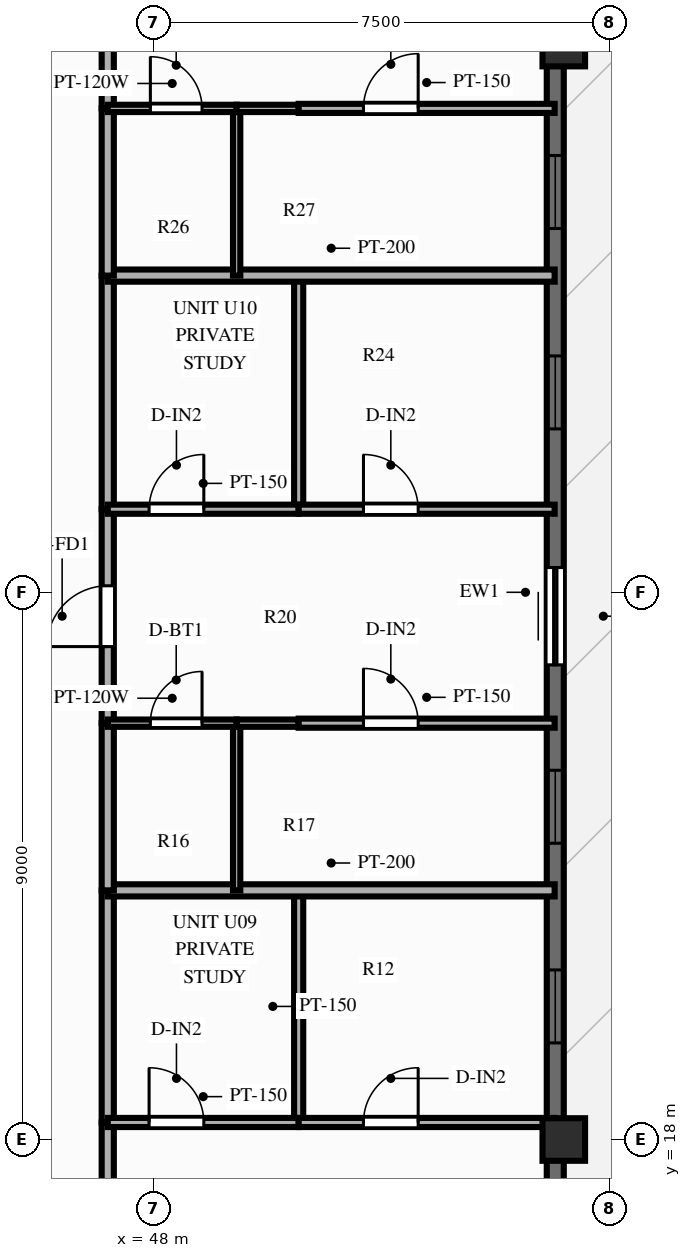
"""IFC4 building model, lengths in metres.
Left out: names, types, materials, properties, quantities, classifications, styles, units other than length and angle.
Written with IfcOpenShell. Run it as: python <this file> out.ifc"""

import sys

from ifc_helpers import new_model, si_unit, direction, frame, frame_2d, origin, origin_2d, place, context, subcontext, project, spatial, rectangle, extrude, source, transform, mapped, element, fill, save


model = new_model("IFC4")
c1 = context("Model", 3, precision=1e-05, world=origin(), true_north=direction((0.0, 1.0)))
c2 = subcontext(c1, "Body", "Model", "MODEL_VIEW")
j1 = project(units=[si_unit("LENGTHUNIT", "METRE"), si_unit("PLANEANGLEUNIT", "RADIAN")], contexts=[c1])
p1 = place(None, origin())
s1 = spatial("IfcSite", under=j1, at=p1, CompositionType="ELEMENT")
p2 = place(p1, origin())
s2 = spatial("IfcBuilding", under=s1, at=p2, CompositionType="ELEMENT")
p3 = place(p2, frame((0.0, 0.0, 236.1)))
s3 = spatial("IfcBuildingStorey", under=s2, at=p3, CompositionType="ELEMENT", Elevation=236.1)
m1 = source(origin(), c2, "Body", "SweptSolid", [
    extrude(rectangle(XDim=0.7, YDim=0.7, at=origin_2d()), origin(), (0.0, 0.0, 1.0), 3.9),
])
for number, where, z_axis, x_axis in (
    (1, (54.75, 18.0, 0.0), (0.0, 0.0, 1.0), (1.0, 0.0, 0.0)),
    (2, (54.75, 36.0, 0.0), (0.0, 0.0, 1.0), (1.0, 0.0, 0.0)),
):
    element("IfcColumn", number, at=place(p3, frame(where, z_axis=z_axis, x_axis=x_axis)), inside=s3, PredefinedType="COLUMN", context=c2, shape_type="MappedRepresentation", body=[
        mapped(m1, transform((0.0, 0.0, 0.0), scale=1.0)),
    ])
p4 = place(p3, frame((54.61, 11.5, 0.0), z_axis=(0.0, 0.0, 1.0), x_axis=(0.0, 1.0, 0.0)))
e3 = element("IfcWall", 3, at=p4, inside=s3, PredefinedType="SOLIDWALL", context=c2, shape_type="SweptSolid", body=[
    extrude(rectangle(XDim=31.0, YDim=0.28, at=frame_2d((15.5, 0.0))), origin(), (0.0, 0.0, 1.0), 2.44),
])
p5 = place(p4, frame((0.96, 0.0, 0.25)))
e4 = element("IfcOpeningElement", 4, at=p5, cuts=e3, PredefinedType="OPENING", context=c2, shape_type="SweptSolid", body=[
    extrude(rectangle(XDim=1.2, YDim=1.5, at=frame_2d((0.6, 0.75))), frame((0.0, 0.152, 0.0), z_axis=(0.0, -1.0, 0.0), x_axis=(1.0, 0.0, 0.0)), (0.0, 0.0, 1.0), 0.304),
])
p6 = place(p4, frame((4.02, 0.0, 0.25)))
e5 = element("IfcOpeningElement", 5, at=p6, cuts=e3, PredefinedType="OPENING", context=c2, shape_type="SweptSolid", body=[
    extrude(rectangle(XDim=1.2, YDim=1.5, at=frame_2d((0.6, 0.75))), frame((0.0, 0.152, 0.0), z_axis=(0.0, -1.0, 0.0), x_axis=(1.0, 0.0, 0.0)), (0.0, 0.0, 1.0), 0.304),
])
p7 = place(p4, frame((8.089, 0.0, 0.25)))
e6 = element("IfcOpeningElement", 6, at=p7, cuts=e3, PredefinedType="OPENING", context=c2, shape_type="SweptSolid", body=[
    extrude(rectangle(XDim=1.2, YDim=1.5, at=frame_2d((0.6, 0.75))), frame((0.0, 0.152, 0.0), z_axis=(0.0, -1.0, 0.0), x_axis=(1.0, 0.0, 0.0)), (0.0, 0.0, 1.0), 0.304),
])
p8 = place(p4, frame((11.373, 0.0, 0.25)))
e7 = element("IfcOpeningElement", 7, at=p8, cuts=e3, PredefinedType="OPENING", context=c2, shape_type="SweptSolid", body=[
    extrude(rectangle(XDim=1.2, YDim=1.5, at=frame_2d((0.6, 0.75))), frame((0.0, 0.152, 0.0), z_axis=(0.0, -1.0, 0.0), x_axis=(1.0, 0.0, 0.0)), (0.0, 0.0, 1.0), 0.304),
])
p9 = place(p4, frame((15.907, 0.0, 0.0), z_axis=(0.0, 0.0, 1.0), x_axis=(-1.0, 0.0, 0.0)))
e8 = element("IfcOpeningElement", 8, at=p9, cuts=e3, PredefinedType="OPENING", context=c2, shape_type="SweptSolid", body=[
    extrude(rectangle(XDim=1.6, YDim=2.15, at=frame_2d((0.8, 1.075))), frame((0.0, 0.152, 0.0), z_axis=(0.0, -1.0, 0.0), x_axis=(1.0, 0.0, 0.0)), (0.0, 0.0, 1.0), 0.304),
])
p10 = place(p4, frame((18.188, 0.0, 0.25)))
e9 = element("IfcOpeningElement", 9, at=p10, cuts=e3, PredefinedType="OPENING", context=c2, shape_type="SweptSolid", body=[
    extrude(rectangle(XDim=1.2, YDim=1.5, at=frame_2d((0.6, 0.75))), frame((0.0, 0.152, 0.0), z_axis=(0.0, -1.0, 0.0), x_axis=(1.0, 0.0, 0.0)), (0.0, 0.0, 1.0), 0.304),
])
p11 = place(p4, frame((21.484, 0.0, 0.25)))
e10 = element("IfcOpeningElement", 10, at=p11, cuts=e3, PredefinedType="OPENING", context=c2, shape_type="SweptSolid", body=[
    extrude(rectangle(XDim=1.2, YDim=1.5, at=frame_2d((0.6, 0.75))), frame((0.0, 0.152, 0.0), z_axis=(0.0, -1.0, 0.0), x_axis=(1.0, 0.0, 0.0)), (0.0, 0.0, 1.0), 0.304),
])
p12 = place(p4, frame((25.234, 0.0, 0.25)))
e11 = element("IfcOpeningElement", 11, at=p12, cuts=e3, PredefinedType="OPENING", context=c2, shape_type="SweptSolid", body=[
    extrude(rectangle(XDim=1.2, YDim=1.5, at=frame_2d((0.6, 0.75))), frame((0.0, 0.152, 0.0), z_axis=(0.0, -1.0, 0.0), x_axis=(1.0, 0.0, 0.0)), (0.0, 0.0, 1.0), 0.304),
])
p13 = place(p4, frame((28.294, 0.0, 0.25)))
e12 = element("IfcOpeningElement", 12, at=p13, cuts=e3, PredefinedType="OPENING", context=c2, shape_type="SweptSolid", body=[
    extrude(rectangle(XDim=1.2, YDim=1.5, at=frame_2d((0.6, 0.75))), frame((0.0, 0.152, 0.0), z_axis=(0.0, -1.0, 0.0), x_axis=(1.0, 0.0, 0.0)), (0.0, 0.0, 1.0), 0.304),
])
p14 = place(p3, frame((47.25, 14.43, 0.0), z_axis=(0.0, 0.0, 1.0), x_axis=(0.0, 1.0, 0.0)))
e13 = element("IfcWall", 13, at=p14, inside=s3, PredefinedType="PARTITIONING", context=c2, shape_type="SweptSolid", body=[
    extrude(rectangle(XDim=3.85, YDim=0.2, at=frame_2d((1.925, 0.0))), origin(), (0.0, 0.0, 1.0), 2.24),
])
p15 = place(p14, frame((1.425, 0.0, 0.0)))
e14 = element("IfcOpeningElement", 14, at=p15, cuts=e13, PredefinedType="OPENING", context=c2, shape_type="SweptSolid", body=[
    extrude(rectangle(XDim=1.0, YDim=2.15, at=frame_2d((0.5, 1.075))), frame((0.0, 0.112, 0.0), z_axis=(0.0, -1.0, 0.0), x_axis=(1.0, 0.0, 0.0)), (0.0, 0.0, 1.0), 0.224),
])
p16 = place(p3, frame((47.25, 18.28, 0.0), z_axis=(0.0, 0.0, 1.0), x_axis=(0.0, 1.0, 0.0)))
e15 = element("IfcWall", 15, at=p16, inside=s3, PredefinedType="PARTITIONING", context=c2, shape_type="SweptSolid", body=[
    extrude(rectangle(XDim=3.818, YDim=0.2, at=frame_2d((1.909, 0.0))), origin(), (0.0, 0.0, 1.0), 3.56),
])
p17 = place(p3, frame((50.39, 18.28, 0.0), z_axis=(0.0, 0.0, 1.0), x_axis=(0.0, 1.0, 0.0)))
e16 = element("IfcWall", 16, at=p17, inside=s3, PredefinedType="PARTITIONING", context=c2, shape_type="SweptSolid", body=[
    extrude(rectangle(XDim=3.818, YDim=0.15, at=frame_2d((1.909, 0.0))), origin(), (0.0, 0.0, 1.0), 3.39),
])
p18 = place(p3, frame((47.25, 18.28, 0.0), z_axis=(0.0, 0.0, 1.0), x_axis=(1.0, 0.0, 0.0)))
e17 = element("IfcWall", 17, at=p18, inside=s3, PredefinedType="PARTITIONING", context=c2, shape_type="SweptSolid", body=[
    extrude(rectangle(XDim=3.14, YDim=0.15, at=frame_2d((1.57, 0.0))), origin(), (0.0, 0.0, 1.0), 3.56),
])
p19 = place(p18, frame((0.68, 0.0, 0.0)))
e18 = element("IfcOpeningElement", 18, at=p19, cuts=e17, PredefinedType="OPENING", context=c2, shape_type="SweptSolid", body=[
    extrude(rectangle(XDim=0.9, YDim=2.1, at=frame_2d((0.45, 1.05))), frame((0.0, 0.087, 0.0), z_axis=(0.0, -1.0, 0.0), x_axis=(1.0, 0.0, 0.0)), (0.0, 0.0, 1.0), 0.174),
])
p20 = place(p3, frame((50.39, 18.28, 0.0), z_axis=(0.0, 0.0, 1.0), x_axis=(1.0, 0.0, 0.0)))
e19 = element("IfcWall", 19, at=p20, inside=s3, PredefinedType="PARTITIONING", context=c2, shape_type="SweptSolid", body=[
    extrude(rectangle(XDim=4.21, YDim=0.15, at=frame_2d((2.105, 0.0))), origin(), (0.0, 0.0, 1.0), 3.56),
])
p21 = place(p20, frame((1.065, 0.0, 0.0)))
e20 = element("IfcOpeningElement", 20, at=p21, cuts=e19, PredefinedType="OPENING", context=c2, shape_type="SweptSolid", body=[
    extrude(rectangle(XDim=0.9, YDim=2.1, at=frame_2d((0.45, 1.05))), frame((0.0, 0.087, 0.0), z_axis=(0.0, -1.0, 0.0), x_axis=(1.0, 0.0, 0.0)), (0.0, 0.0, 1.0), 0.174),
])
p22 = place(p3, frame((47.25, 22.098, 0.0), z_axis=(0.0, 0.0, 1.0), x_axis=(1.0, 0.0, 0.0)))
e21 = element("IfcWall", 21, at=p22, inside=s3, PredefinedType="PARTITIONING", context=c2, shape_type="SweptSolid", body=[
    extrude(rectangle(XDim=7.35, YDim=0.2, at=frame_2d((3.675, 0.0))), origin(), (0.0, 0.0, 1.0), 3.29),
])
p23 = place(p3, frame((47.25, 22.098, 0.0), z_axis=(0.0, 0.0, 1.0), x_axis=(0.0, 1.0, 0.0)))
e22 = element("IfcWall", 22, at=p23, inside=s3, PredefinedType="PARTITIONING", context=c2, shape_type="SweptSolid", body=[
    extrude(rectangle(XDim=2.75, YDim=0.2, at=frame_2d((1.375, 0.0))), origin(), (0.0, 0.0, 1.0), 3.56),
])
p24 = place(p3, frame((47.25, 24.848, 0.0), z_axis=(0.0, 0.0, 1.0), x_axis=(0.0, 1.0, 0.0)))
e23 = element("IfcWall", 23, at=p24, inside=s3, PredefinedType="PARTITIONING", context=c2, shape_type="SweptSolid", body=[
    extrude(rectangle(XDim=3.519, YDim=0.2, at=frame_2d((1.759, 0.0))), origin(), (0.0, 0.0, 1.0), 3.56),
])
p25 = place(p24, frame((1.26, 0.0, 0.0)))
e24 = element("IfcOpeningElement", 24, at=p25, cuts=e23, PredefinedType="OPENING", context=c2, shape_type="SweptSolid", body=[
    extrude(rectangle(XDim=1.0, YDim=2.15, at=frame_2d((0.5, 1.075))), frame((0.0, 0.112, 0.0), z_axis=(0.0, -1.0, 0.0), x_axis=(1.0, 0.0, 0.0)), (0.0, 0.0, 1.0), 0.224),
])
p26 = place(p3, frame((47.25, 28.366, 0.0), z_axis=(0.0, 0.0, 1.0), x_axis=(0.0, 1.0, 0.0)))
e25 = element("IfcWall", 25, at=p26, inside=s3, PredefinedType="PARTITIONING", context=c2, shape_type="SweptSolid", body=[
    extrude(rectangle(XDim=3.842, YDim=0.2, at=frame_2d((1.921, 0.0))), origin(), (0.0, 0.0, 1.0), 3.56),
])
p27 = place(p3, frame((49.37, 22.098, 0.0), z_axis=(0.0, 0.0, 1.0), x_axis=(0.0, 1.0, 0.0)))
e26 = element("IfcWall", 26, at=p27, inside=s3, PredefinedType="PARTITIONING", context=c2, shape_type="SweptSolid", body=[
    extrude(rectangle(XDim=2.75, YDim=0.12, at=frame_2d((1.375, 0.0))), origin(), (0.0, 0.0, 1.0), 3.39),
])
p28 = place(p3, frame((50.39, 28.366, 0.0), z_axis=(0.0, 0.0, 1.0), x_axis=(0.0, 1.0, 0.0)))
e27 = element("IfcWall", 27, at=p28, inside=s3, PredefinedType="PARTITIONING", context=c2, shape_type="SweptSolid", body=[
    extrude(rectangle(XDim=3.842, YDim=0.15, at=frame_2d((1.921, 0.0))), origin(), (0.0, 0.0, 1.0), 3.39),
])
p29 = place(p3, frame((47.25, 24.848, 0.0), z_axis=(0.0, 0.0, 1.0), x_axis=(1.0, 0.0, 0.0)))
e28 = element("IfcWall", 28, at=p29, inside=s3, PredefinedType="PARTITIONING", context=c2, shape_type="SweptSolid", body=[
    extrude(rectangle(XDim=2.12, YDim=0.12, at=frame_2d((1.06, 0.0))), origin(), (0.0, 0.0, 1.0), 3.56),
])
p30 = place(p29, frame((0.701, 0.0, 0.0)))
e29 = element("IfcOpeningElement", 29, at=p30, cuts=e28, PredefinedType="OPENING", context=c2, shape_type="SweptSolid", body=[
    extrude(rectangle(XDim=0.85, YDim=2.05, at=frame_2d((0.425, 1.025))), frame((0.0, 0.072, 0.0), z_axis=(0.0, -1.0, 0.0), x_axis=(1.0, 0.0, 0.0)), (0.0, 0.0, 1.0), 0.144),
])
p31 = place(p3, frame((49.37, 24.848, 0.0), z_axis=(0.0, 0.0, 1.0), x_axis=(1.0, 0.0, 0.0)))
e30 = element("IfcWall", 30, at=p31, inside=s3, PredefinedType="PARTITIONING", context=c2, shape_type="SweptSolid", body=[
    extrude(rectangle(XDim=1.02, YDim=0.12, at=frame_2d((0.51, 0.0))), origin(), (0.0, 0.0, 1.0), 3.56),
])
p32 = place(p3, frame((50.39, 24.848, 0.0), z_axis=(0.0, 0.0, 1.0), x_axis=(1.0, 0.0, 0.0)))
e31 = element("IfcWall", 31, at=p32, inside=s3, PredefinedType="PARTITIONING", context=c2, shape_type="SweptSolid", body=[
    extrude(rectangle(XDim=4.21, YDim=0.15, at=frame_2d((2.105, 0.0))), origin(), (0.0, 0.0, 1.0), 3.56),
])
p33 = place(p32, frame((1.065, 0.0, 0.0)))
e32 = element("IfcOpeningElement", 32, at=p33, cuts=e31, PredefinedType="OPENING", context=c2, shape_type="SweptSolid", body=[
    extrude(rectangle(XDim=0.9, YDim=2.1, at=frame_2d((0.45, 1.05))), frame((0.0, 0.087, 0.0), z_axis=(0.0, -1.0, 0.0), x_axis=(1.0, 0.0, 0.0)), (0.0, 0.0, 1.0), 0.174),
])
p34 = place(p3, frame((47.25, 28.366, 0.0), z_axis=(0.0, 0.0, 1.0), x_axis=(1.0, 0.0, 0.0)))
e33 = element("IfcWall", 33, at=p34, inside=s3, PredefinedType="PARTITIONING", context=c2, shape_type="SweptSolid", body=[
    extrude(rectangle(XDim=3.14, YDim=0.15, at=frame_2d((1.57, 0.0))), origin(), (0.0, 0.0, 1.0), 3.56),
])
p35 = place(p34, frame((0.68, 0.0, 0.0)))
e34 = element("IfcOpeningElement", 34, at=p35, cuts=e33, PredefinedType="OPENING", context=c2, shape_type="SweptSolid", body=[
    extrude(rectangle(XDim=0.9, YDim=2.1, at=frame_2d((0.45, 1.05))), frame((0.0, 0.087, 0.0), z_axis=(0.0, -1.0, 0.0), x_axis=(1.0, 0.0, 0.0)), (0.0, 0.0, 1.0), 0.174),
])
p36 = place(p3, frame((50.39, 28.366, 0.0), z_axis=(0.0, 0.0, 1.0), x_axis=(1.0, 0.0, 0.0)))
e35 = element("IfcWall", 35, at=p36, inside=s3, PredefinedType="PARTITIONING", context=c2, shape_type="SweptSolid", body=[
    extrude(rectangle(XDim=4.21, YDim=0.15, at=frame_2d((2.105, 0.0))), origin(), (0.0, 0.0, 1.0), 3.56),
])
p37 = place(p36, frame((1.065, 0.0, 0.0)))
e36 = element("IfcOpeningElement", 36, at=p37, cuts=e35, PredefinedType="OPENING", context=c2, shape_type="SweptSolid", body=[
    extrude(rectangle(XDim=0.9, YDim=2.1, at=frame_2d((0.45, 1.05))), frame((0.0, 0.087, 0.0), z_axis=(0.0, -1.0, 0.0), x_axis=(1.0, 0.0, 0.0)), (0.0, 0.0, 1.0), 0.174),
])
p38 = place(p3, frame((47.25, 32.209, 0.0), z_axis=(0.0, 0.0, 1.0), x_axis=(1.0, 0.0, 0.0)))
e37 = element("IfcWall", 37, at=p38, inside=s3, PredefinedType="PARTITIONING", context=c2, shape_type="SweptSolid", body=[
    extrude(rectangle(XDim=7.35, YDim=0.2, at=frame_2d((3.675, 0.0))), origin(), (0.0, 0.0, 1.0), 3.29),
])
p39 = place(p3, frame((47.25, 32.209, 0.0), z_axis=(0.0, 0.0, 1.0), x_axis=(0.0, 1.0, 0.0)))
e38 = element("IfcWall", 38, at=p39, inside=s3, PredefinedType="PARTITIONING", context=c2, shape_type="SweptSolid", body=[
    extrude(rectangle(XDim=2.75, YDim=0.2, at=frame_2d((1.375, 0.0))), origin(), (0.0, 0.0, 1.0), 3.56),
])
p40 = place(p3, frame((47.25, 34.959, 0.0), z_axis=(0.0, 0.0, 1.0), x_axis=(0.0, 1.0, 0.0)))
e39 = element("IfcWall", 39, at=p40, inside=s3, PredefinedType="PARTITIONING", context=c2, shape_type="SweptSolid", body=[
    extrude(rectangle(XDim=3.519, YDim=0.2, at=frame_2d((1.76, 0.0))), origin(), (0.0, 0.0, 1.0), 2.24),
])
p41 = place(p40, frame((2.217, 0.0, 0.0)))
e40 = element("IfcOpeningElement", 40, at=p41, cuts=e39, PredefinedType="OPENING", context=c2, shape_type="SweptSolid", body=[
    extrude(rectangle(XDim=1.0, YDim=2.15, at=frame_2d((0.5, 1.075))), frame((0.0, 0.112, 0.0), z_axis=(0.0, -1.0, 0.0), x_axis=(1.0, 0.0, 0.0)), (0.0, 0.0, 1.0), 0.224),
])
p42 = place(p3, frame((49.37, 32.209, 0.0), z_axis=(0.0, 0.0, 1.0), x_axis=(0.0, 1.0, 0.0)))
e41 = element("IfcWall", 41, at=p42, inside=s3, PredefinedType="PARTITIONING", context=c2, shape_type="SweptSolid", body=[
    extrude(rectangle(XDim=2.75, YDim=0.12, at=frame_2d((1.375, 0.0))), origin(), (0.0, 0.0, 1.0), 3.39),
])
p43 = place(p3, frame((47.25, 34.959, 0.0), z_axis=(0.0, 0.0, 1.0), x_axis=(1.0, 0.0, 0.0)))
e42 = element("IfcWall", 42, at=p43, inside=s3, PredefinedType="PARTITIONING", context=c2, shape_type="SweptSolid", body=[
    extrude(rectangle(XDim=2.12, YDim=0.12, at=frame_2d((1.06, 0.0))), origin(), (0.0, 0.0, 1.0), 3.56),
])
p44 = place(p43, frame((0.701, 0.0, 0.0)))
e43 = element("IfcOpeningElement", 43, at=p44, cuts=e42, PredefinedType="OPENING", context=c2, shape_type="SweptSolid", body=[
    extrude(rectangle(XDim=0.85, YDim=2.05, at=frame_2d((0.425, 1.025))), frame((0.0, 0.072, 0.0), z_axis=(0.0, -1.0, 0.0), x_axis=(1.0, 0.0, 0.0)), (0.0, 0.0, 1.0), 0.144),
])
p45 = place(p3, frame((49.37, 34.959, 0.0), z_axis=(0.0, 0.0, 1.0), x_axis=(1.0, 0.0, 0.0)))
e44 = element("IfcWall", 44, at=p45, inside=s3, PredefinedType="PARTITIONING", context=c2, shape_type="SweptSolid", body=[
    extrude(rectangle(XDim=1.02, YDim=0.12, at=frame_2d((0.51, 0.0))), origin(), (0.0, 0.0, 1.0), 3.56),
])
p46 = place(p3, frame((50.39, 34.959, 0.0), z_axis=(0.0, 0.0, 1.0), x_axis=(1.0, 0.0, 0.0)))
e45 = element("IfcWall", 45, at=p46, inside=s3, PredefinedType="PARTITIONING", context=c2, shape_type="SweptSolid", body=[
    extrude(rectangle(XDim=4.21, YDim=0.15, at=frame_2d((2.105, 0.0))), origin(), (0.0, 0.0, 1.0), 3.56),
])
p47 = place(p46, frame((1.065, 0.0, 0.0)))
e46 = element("IfcOpeningElement", 46, at=p47, cuts=e45, PredefinedType="OPENING", context=c2, shape_type="SweptSolid", body=[
    extrude(rectangle(XDim=0.9, YDim=2.1, at=frame_2d((0.45, 1.05))), frame((0.0, 0.087, 0.0), z_axis=(0.0, -1.0, 0.0), x_axis=(1.0, 0.0, 0.0)), (0.0, 0.0, 1.0), 0.174),
])
m2 = source(origin(), c2, "Body", "SweptSolid", [
    extrude(rectangle(XDim=1.2, YDim=1.5, at=frame_2d((0.6, 0.75))), frame((0.0, 0.03, 0.0), z_axis=(0.0, -1.0, 0.0), x_axis=(1.0, 0.0, 0.0)), (0.0, 0.0, 1.0), 0.06),
])
p48 = place(p7, origin())
e47 = element("IfcWindow", 47, at=p48, inside=s3, PartitioningType="SINGLE_PANEL", PredefinedType="WINDOW", context=c2, shape_type="MappedRepresentation", body=[
    mapped(m2, transform((0.0, 0.0, 0.0), scale=1.0)),
])
fill(e6, e47)
p49 = place(p8, origin())
e48 = element("IfcWindow", 48, at=p49, inside=s3, PartitioningType="SINGLE_PANEL", PredefinedType="WINDOW", context=c2, shape_type="MappedRepresentation", body=[
    mapped(m2, transform((0.0, 0.0, 0.0), scale=1.0)),
])
fill(e7, e48)
m3 = source(origin(), c2, "Body", "SweptSolid", [
    extrude(rectangle(XDim=1.6, YDim=2.15, at=frame_2d((0.8, 1.075))), frame((0.0, 0.025, 0.0), z_axis=(0.0, -1.0, 0.0), x_axis=(1.0, 0.0, 0.0)), (0.0, 0.0, 1.0), 0.05),
])
p50 = place(p9, origin())
e49 = element("IfcDoor", 49, at=p50, inside=s3, OperationType="SLIDING_TO_LEFT", PredefinedType="DOOR", context=c2, shape_type="MappedRepresentation", body=[
    mapped(m3, transform((0.0, 0.0, 0.0), scale=1.0)),
])
fill(e8, e49)
p51 = place(p10, origin())
e50 = element("IfcWindow", 50, at=p51, inside=s3, PartitioningType="SINGLE_PANEL", PredefinedType="WINDOW", context=c2, shape_type="MappedRepresentation", body=[
    mapped(m2, transform((0.0, 0.0, 0.0), scale=1.0)),
])
fill(e9, e50)
p52 = place(p11, origin())
e51 = element("IfcWindow", 51, at=p52, inside=s3, PartitioningType="SINGLE_PANEL", PredefinedType="WINDOW", context=c2, shape_type="MappedRepresentation", body=[
    mapped(m2, transform((0.0, 0.0, 0.0), scale=1.0)),
])
fill(e10, e51)
m4 = source(origin(), c2, "Body", "SweptSolid", [
    extrude(rectangle(XDim=0.9, YDim=2.1, at=frame_2d((0.45, 1.05))), frame((0.0, 0.025, 0.0), z_axis=(0.0, -1.0, 0.0), x_axis=(1.0, 0.0, 0.0)), (0.0, 0.0, 1.0), 0.05),
])
p53 = place(p19, origin())
e52 = element("IfcDoor", 52, at=p53, inside=s3, OperationType="SINGLE_SWING_LEFT", PredefinedType="DOOR", context=c2, shape_type="MappedRepresentation", body=[
    mapped(m4, transform((0.0, 0.0, 0.0), scale=1.0)),
])
fill(e18, e52)
p54 = place(p21, origin())
e53 = element("IfcDoor", 53, at=p54, inside=s3, OperationType="SINGLE_SWING_RIGHT", PredefinedType="DOOR", context=c2, shape_type="MappedRepresentation", body=[
    mapped(m4, transform((0.0, 0.0, 0.0), scale=1.0)),
])
fill(e20, e53)
m5 = source(origin(), c2, "Body", "SweptSolid", [
    extrude(rectangle(XDim=1.0, YDim=2.15, at=frame_2d((0.5, 1.075))), frame((0.0, 0.025, 0.0), z_axis=(0.0, -1.0, 0.0), x_axis=(1.0, 0.0, 0.0)), (0.0, 0.0, 1.0), 0.05),
])
p55 = place(p25, origin())
e54 = element("IfcDoor", 54, at=p55, inside=s3, OperationType="SINGLE_SWING_LEFT", PredefinedType="DOOR", context=c2, shape_type="MappedRepresentation", body=[
    mapped(m5, transform((0.0, 0.0, 0.0), scale=1.0)),
])
fill(e24, e54)
m6 = source(origin(), c2, "Body", "SweptSolid", [
    extrude(rectangle(XDim=0.85, YDim=2.05, at=frame_2d((0.425, 1.025))), frame((0.0, 0.025, 0.0), z_axis=(0.0, -1.0, 0.0), x_axis=(1.0, 0.0, 0.0)), (0.0, 0.0, 1.0), 0.05),
])
p56 = place(p30, origin())
e55 = element("IfcDoor", 55, at=p56, inside=s3, OperationType="SINGLE_SWING_RIGHT", PredefinedType="DOOR", context=c2, shape_type="MappedRepresentation", body=[
    mapped(m6, transform((0.0, 0.0, 0.0), scale=1.0)),
])
fill(e29, e55)
p57 = place(p33, origin())
e56 = element("IfcDoor", 56, at=p57, inside=s3, OperationType="SINGLE_SWING_LEFT", PredefinedType="DOOR", context=c2, shape_type="MappedRepresentation", body=[
    mapped(m4, transform((0.0, 0.0, 0.0), scale=1.0)),
])
fill(e32, e56)
p58 = place(p35, origin())
e57 = element("IfcDoor", 57, at=p58, inside=s3, OperationType="SINGLE_SWING_RIGHT", PredefinedType="DOOR", context=c2, shape_type="MappedRepresentation", body=[
    mapped(m4, transform((0.0, 0.0, 0.0), scale=1.0)),
])
fill(e34, e57)
p59 = place(p37, origin())
e58 = element("IfcDoor", 58, at=p59, inside=s3, OperationType="SINGLE_SWING_LEFT", PredefinedType="DOOR", context=c2, shape_type="MappedRepresentation", body=[
    mapped(m4, transform((0.0, 0.0, 0.0), scale=1.0)),
])
fill(e36, e58)
p60 = place(p44, origin())
e59 = element("IfcDoor", 59, at=p60, inside=s3, OperationType="SINGLE_SWING_LEFT", PredefinedType="DOOR", context=c2, shape_type="MappedRepresentation", body=[
    mapped(m6, transform((0.0, 0.0, 0.0), scale=1.0)),
])
fill(e43, e59)
p61 = place(p47, origin())
e60 = element("IfcDoor", 60, at=p61, inside=s3, OperationType="SINGLE_SWING_RIGHT", PredefinedType="DOOR", context=c2, shape_type="MappedRepresentation", body=[
    mapped(m4, transform((0.0, 0.0, 0.0), scale=1.0)),
])
fill(e46, e60)
save(model, sys.argv[1])
